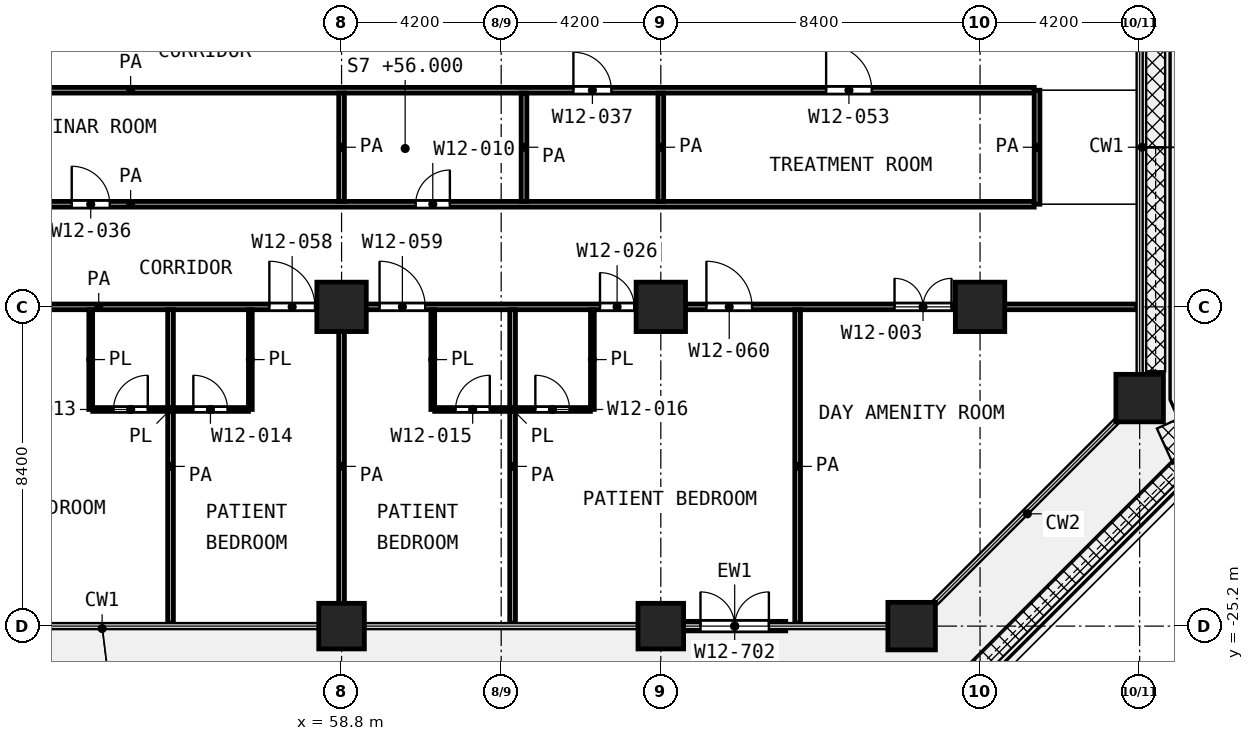
"""IFC4 building model, lengths in metres.
Left out: names, types, materials, properties, quantities, classifications, styles, units other than length and angle.
Written with IfcOpenShell. Run it as: python <this file> out.ifc"""

import sys

from ifc_helpers import new_model, si_unit, direction, frame, frame_2d, origin, origin_2d, place, context, subcontext, project, spatial, rectangle, extrude, element, fill, save


model = new_model("IFC4")
c1 = context("Model", 3, precision=1e-05, world=origin(), true_north=direction((0.0, 1.0)))
c2 = subcontext(c1, "Body", "Model", "MODEL_VIEW")
j1 = project(units=[si_unit("LENGTHUNIT", "METRE"), si_unit("PLANEANGLEUNIT", "RADIAN")], contexts=[c1])
p1 = place(None, origin())
s1 = spatial("IfcSite", under=j1, at=p1, CompositionType="ELEMENT")
p2 = place(p1, origin())
s2 = spatial("IfcBuilding", under=s1, at=p2, CompositionType="ELEMENT")
p3 = place(p2, frame((0.0, 0.0, 56.0)))
s3 = spatial("IfcBuildingStorey", under=s2, at=p3, CompositionType="ELEMENT", Elevation=56.0)
for number, where, z_axis, x_axis in (
    (1, (58.8, -16.8, 0.0), (0.0, 0.0, 1.0), (1.0, 0.0, 0.0)),
    (2, (67.2, -16.8, 0.0), (0.0, 0.0, 1.0), (1.0, 0.0, 0.0)),
    (3, (75.6, -16.8, 0.0), (0.0, 0.0, 1.0), (1.0, 0.0, 0.0)),
):
    element("IfcColumn", number, at=place(p3, frame(where, z_axis=z_axis, x_axis=x_axis)), inside=s3, PredefinedType="COLUMN", context=c2, shape_type="SweptSolid", body=[
        extrude(rectangle(XDim=1.3, YDim=1.3, at=origin_2d()), origin(), (0.0, 0.0, 1.0), 4.2),
    ])
p4 = place(p3, frame((79.8, -19.2, 0.0), z_axis=(0.0, 0.0, 1.0), x_axis=(1.0, 0.0, 0.0)))
e4 = element("IfcColumn", 4, at=p4, inside=s3, PredefinedType="COLUMN", context=c2, shape_type="SweptSolid", body=[
    extrude(rectangle(XDim=1.25, YDim=1.25, at=origin_2d()), origin(), (0.0, 0.0, 1.0), 4.2),
])
for number, where, z_axis, x_axis in (
    (5, (58.8, -25.2, 0.0), (0.0, 0.0, 1.0), (1.0, 0.0, 0.0)),
    (6, (67.2, -25.2, 0.0), (0.0, 0.0, 1.0), (1.0, 0.0, 0.0)),
):
    element("IfcColumn", number, at=place(p3, frame(where, z_axis=z_axis, x_axis=x_axis)), inside=s3, PredefinedType="COLUMN", context=c2, shape_type="SweptSolid", body=[
        extrude(rectangle(XDim=1.2, YDim=1.2, at=origin_2d()), origin(), (0.0, 0.0, 1.0), 4.2),
    ])
p5 = place(p3, frame((73.8, -25.2, 0.0), z_axis=(0.0, 0.0, 1.0), x_axis=(1.0, 0.0, 0.0)))
e7 = element("IfcColumn", 7, at=p5, inside=s3, PredefinedType="COLUMN", context=c2, shape_type="SweptSolid", body=[
    extrude(rectangle(XDim=1.25, YDim=1.25, at=origin_2d()), origin(), (0.0, 0.0, 1.0), 4.2),
])
p6 = place(p3, frame((67.8, -25.2, 0.0), z_axis=(0.0, 0.0, 1.0), x_axis=(1.0, 0.0, 0.0)))
e8 = element("IfcWall", 8, at=p6, inside=s3, PredefinedType="SOLIDWALL", context=c2, shape_type="SweptSolid", body=[
    extrude(rectangle(XDim=2.688, YDim=0.25, at=frame_2d((1.344, 0.0))), origin(), (0.0, 0.0, 1.0), 3.78),
])
p7 = place(p6, frame((0.444, 0.0, 0.0)))
e9 = element("IfcOpeningElement", 9, at=p7, cuts=e8, PredefinedType="OPENING", context=c2, shape_type="SweptSolid", body=[
    extrude(rectangle(XDim=1.8, YDim=2.1, at=frame_2d((0.9, 1.05))), frame((0.0, 0.135, 0.0), z_axis=(0.0, -1.0, 0.0), x_axis=(1.0, 0.0, 0.0)), (0.0, 0.0, 1.0), 0.27),
])
p8 = place(p3, frame((52.252, -19.5, 0.0), z_axis=(0.0, 0.0, 1.0), x_axis=(1.0, 0.0, 0.0)))
e10 = element("IfcWall", 10, at=p8, inside=s3, PredefinedType="PARTITIONING", context=c2, shape_type="SweptSolid", body=[
    extrude(rectangle(XDim=4.098, YDim=0.1, at=frame_2d((2.049, 0.0))), origin(), (0.0, 0.0, 1.0), 3.9),
])
p9 = place(p8, frame((0.549, 0.0, 0.0)))
e11 = element("IfcOpeningElement", 11, at=p9, cuts=e10, PredefinedType="OPENING", context=c2, shape_type="SweptSolid", body=[
    extrude(rectangle(XDim=0.9, YDim=2.1, at=frame_2d((0.45, 1.05))), frame((0.0, 0.06, 0.0), z_axis=(0.0, -1.0, 0.0), x_axis=(1.0, 0.0, 0.0)), (0.0, 0.0, 1.0), 0.12),
])
p10 = place(p8, frame((2.648, 0.0, 0.0)))
e12 = element("IfcOpeningElement", 12, at=p10, cuts=e10, PredefinedType="OPENING", context=c2, shape_type="SweptSolid", body=[
    extrude(rectangle(XDim=0.9, YDim=2.1, at=frame_2d((0.45, 1.05))), frame((0.0, 0.06, 0.0), z_axis=(0.0, -1.0, 0.0), x_axis=(1.0, 0.0, 0.0)), (0.0, 0.0, 1.0), 0.12),
])
p11 = place(p3, frame((61.25, -19.5, 0.0), z_axis=(0.0, 0.0, 1.0), x_axis=(1.0, 0.0, 0.0)))
e13 = element("IfcWall", 13, at=p11, inside=s3, PredefinedType="PARTITIONING", context=c2, shape_type="SweptSolid", body=[
    extrude(rectangle(XDim=4.098, YDim=0.1, at=frame_2d((2.049, 0.0))), origin(), (0.0, 0.0, 1.0), 3.9),
])
p12 = place(p11, frame((0.55, 0.0, 0.0)))
e14 = element("IfcOpeningElement", 14, at=p12, cuts=e13, PredefinedType="OPENING", context=c2, shape_type="SweptSolid", body=[
    extrude(rectangle(XDim=0.9, YDim=2.1, at=frame_2d((0.45, 1.05))), frame((0.0, 0.06, 0.0), z_axis=(0.0, -1.0, 0.0), x_axis=(1.0, 0.0, 0.0)), (0.0, 0.0, 1.0), 0.12),
])
p13 = place(p11, frame((2.649, 0.0, 0.0)))
e15 = element("IfcOpeningElement", 15, at=p13, cuts=e13, PredefinedType="OPENING", context=c2, shape_type="SweptSolid", body=[
    extrude(rectangle(XDim=0.9, YDim=2.1, at=frame_2d((0.45, 1.05))), frame((0.0, 0.06, 0.0), z_axis=(0.0, -1.0, 0.0), x_axis=(1.0, 0.0, 0.0)), (0.0, 0.0, 1.0), 0.12),
])
p14 = place(p3, frame((52.2, -19.499, 0.0), z_axis=(0.0, 0.0, 1.0), x_axis=(0.0, 1.0, 0.0)))
e16 = element("IfcWall", 16, at=p14, inside=s3, PredefinedType="PARTITIONING", context=c2, shape_type="SweptSolid", body=[
    extrude(rectangle(XDim=2.624, YDim=0.1, at=frame_2d((1.312, 0.0))), origin(), (0.0, 0.0, 1.0), 3.9),
])
for number, where, z_axis, x_axis in (
    (17, (56.4, -19.5, 0.0), (0.0, 0.0, 1.0), (0.0, 1.0, 0.0)),
    (18, (61.2, -19.5, 0.0), (0.0, 0.0, 1.0), (0.0, 1.0, 0.0)),
):
    element("IfcWall", number, at=place(p3, frame(where, z_axis=z_axis, x_axis=x_axis)), inside=s3, PredefinedType="PARTITIONING", context=c2, shape_type="SweptSolid", body=[
        extrude(rectangle(XDim=2.625, YDim=0.1, at=frame_2d((1.312, 0.0))), origin(), (0.0, 0.0, 1.0), 3.9),
    ])
p15 = place(p3, frame((65.4, -19.499, 0.0), z_axis=(0.0, 0.0, 1.0), x_axis=(0.0, 1.0, 0.0)))
e19 = element("IfcWall", 19, at=p15, inside=s3, PredefinedType="PARTITIONING", context=c2, shape_type="SweptSolid", body=[
    extrude(rectangle(XDim=2.624, YDim=0.1, at=frame_2d((1.312, 0.0))), origin(), (0.0, 0.0, 1.0), 3.9),
])
p16 = place(p3, frame((25.1, -16.8, 0.0), z_axis=(0.0, 0.0, 1.0), x_axis=(1.0, 0.0, 0.0)))
e20 = element("IfcWall", 20, at=p16, inside=s3, PredefinedType="PARTITIONING", context=c2, shape_type="SweptSolid", body=[
    extrude(rectangle(XDim=54.62, YDim=0.15, at=frame_2d((27.31, 0.0))), origin(), (0.0, 0.0, 1.0), 3.9),
])
p17 = place(p16, frame((1.45, 0.0, 0.0)))
e21 = element("IfcOpeningElement", 21, at=p17, cuts=e20, PredefinedType="OPENING", context=c2, shape_type="SweptSolid", body=[
    extrude(rectangle(XDim=1.5, YDim=2.1, at=frame_2d((0.75, 1.05))), frame((0.0, 0.085, 0.0), z_axis=(0.0, -1.0, 0.0), x_axis=(1.0, 0.0, 0.0)), (0.0, 0.0, 1.0), 0.17),
])
p18 = place(p16, frame((5.9, 0.0, 0.0)))
e22 = element("IfcOpeningElement", 22, at=p18, cuts=e20, PredefinedType="OPENING", context=c2, shape_type="SweptSolid", body=[
    extrude(rectangle(XDim=1.0, YDim=2.1, at=frame_2d((0.5, 1.05))), frame((0.0, 0.085, 0.0), z_axis=(0.0, -1.0, 0.0), x_axis=(1.0, 0.0, 0.0)), (0.0, 0.0, 1.0), 0.17),
])
p19 = place(p16, frame((10.0, 0.0, 0.0)))
e23 = element("IfcOpeningElement", 23, at=p19, cuts=e20, PredefinedType="OPENING", context=c2, shape_type="SweptSolid", body=[
    extrude(rectangle(XDim=1.2, YDim=2.1, at=frame_2d((0.6, 1.05))), frame((0.0, 0.085, 0.0), z_axis=(0.0, -1.0, 0.0), x_axis=(1.0, 0.0, 0.0)), (0.0, 0.0, 1.0), 0.17),
])
p20 = place(p16, frame((15.0, 0.0, 0.0)))
e24 = element("IfcOpeningElement", 24, at=p20, cuts=e20, PredefinedType="OPENING", context=c2, shape_type="SweptSolid", body=[
    extrude(rectangle(XDim=1.2, YDim=2.1, at=frame_2d((0.6, 1.05))), frame((0.0, 0.085, 0.0), z_axis=(0.0, -1.0, 0.0), x_axis=(1.0, 0.0, 0.0)), (0.0, 0.0, 1.0), 0.17),
])
p21 = place(p16, frame((18.1, 0.0, 0.0)))
e25 = element("IfcOpeningElement", 25, at=p21, cuts=e20, PredefinedType="OPENING", context=c2, shape_type="SweptSolid", body=[
    extrude(rectangle(XDim=1.2, YDim=2.1, at=frame_2d((0.6, 1.05))), frame((0.0, 0.085, 0.0), z_axis=(0.0, -1.0, 0.0), x_axis=(1.0, 0.0, 0.0)), (0.0, 0.0, 1.0), 0.17),
])
p22 = place(p16, frame((23.4, 0.0, 0.0)))
e26 = element("IfcOpeningElement", 26, at=p22, cuts=e20, PredefinedType="OPENING", context=c2, shape_type="SweptSolid", body=[
    extrude(rectangle(XDim=1.2, YDim=2.1, at=frame_2d((0.6, 1.05))), frame((0.0, 0.085, 0.0), z_axis=(0.0, -1.0, 0.0), x_axis=(1.0, 0.0, 0.0)), (0.0, 0.0, 1.0), 0.17),
])
p23 = place(p16, frame((21.95, 0.0, 0.0)))
e27 = element("IfcOpeningElement", 27, at=p23, cuts=e20, PredefinedType="OPENING", context=c2, shape_type="SweptSolid", body=[
    extrude(rectangle(XDim=1.1, YDim=2.1, at=frame_2d((0.55, 1.05))), frame((0.0, 0.085, 0.0), z_axis=(0.0, -1.0, 0.0), x_axis=(1.0, 0.0, 0.0)), (0.0, 0.0, 1.0), 0.17),
])
p24 = place(p16, frame((31.8, 0.0, 0.0)))
e28 = element("IfcOpeningElement", 28, at=p24, cuts=e20, PredefinedType="OPENING", context=c2, shape_type="SweptSolid", body=[
    extrude(rectangle(XDim=1.2, YDim=2.1, at=frame_2d((0.6, 1.05))), frame((0.0, 0.085, 0.0), z_axis=(0.0, -1.0, 0.0), x_axis=(1.0, 0.0, 0.0)), (0.0, 0.0, 1.0), 0.17),
])
p25 = place(p16, frame((34.7, 0.0, 0.0)))
e29 = element("IfcOpeningElement", 29, at=p25, cuts=e20, PredefinedType="OPENING", context=c2, shape_type="SweptSolid", body=[
    extrude(rectangle(XDim=1.2, YDim=2.1, at=frame_2d((0.6, 1.05))), frame((0.0, 0.085, 0.0), z_axis=(0.0, -1.0, 0.0), x_axis=(1.0, 0.0, 0.0)), (0.0, 0.0, 1.0), 0.17),
])
p26 = place(p16, frame((43.3, 0.0, 0.0)))
e30 = element("IfcOpeningElement", 30, at=p26, cuts=e20, PredefinedType="OPENING", context=c2, shape_type="SweptSolid", body=[
    extrude(rectangle(XDim=1.2, YDim=2.1, at=frame_2d((0.6, 1.05))), frame((0.0, 0.085, 0.0), z_axis=(0.0, -1.0, 0.0), x_axis=(1.0, 0.0, 0.0)), (0.0, 0.0, 1.0), 0.17),
])
p27 = place(p16, frame((40.5, 0.0, 0.0)))
e31 = element("IfcOpeningElement", 31, at=p27, cuts=e20, PredefinedType="OPENING", context=c2, shape_type="SweptSolid", body=[
    extrude(rectangle(XDim=0.9, YDim=2.1, at=frame_2d((0.45, 1.05))), frame((0.0, 0.085, 0.0), z_axis=(0.0, -1.0, 0.0), x_axis=(1.0, 0.0, 0.0)), (0.0, 0.0, 1.0), 0.17),
])
p28 = place(p16, frame((48.25, 0.0, 0.0)))
e32 = element("IfcOpeningElement", 32, at=p28, cuts=e20, PredefinedType="OPENING", context=c2, shape_type="SweptSolid", body=[
    extrude(rectangle(XDim=1.5, YDim=2.1, at=frame_2d((0.75, 1.05))), frame((0.0, 0.085, 0.0), z_axis=(0.0, -1.0, 0.0), x_axis=(1.0, 0.0, 0.0)), (0.0, 0.0, 1.0), 0.17),
])
p29 = place(p3, frame((29.475, -14.1, 0.0), z_axis=(0.0, 0.0, 1.0), x_axis=(1.0, 0.0, 0.0)))
e33 = element("IfcWall", 33, at=p29, inside=s3, PredefinedType="PARTITIONING", context=c2, shape_type="SweptSolid", body=[
    extrude(rectangle(XDim=47.55, YDim=0.15, at=frame_2d((23.775, 0.0))), origin(), (0.0, 0.0, 1.0), 3.9),
])
p30 = place(p29, frame((7.525, 0.0, 0.0)))
e34 = element("IfcOpeningElement", 34, at=p30, cuts=e33, PredefinedType="OPENING", context=c2, shape_type="SweptSolid", body=[
    extrude(rectangle(XDim=1.0, YDim=2.1, at=frame_2d((0.5, 1.05))), frame((0.0, 0.085, 0.0), z_axis=(0.0, -1.0, 0.0), x_axis=(1.0, 0.0, 0.0)), (0.0, 0.0, 1.0), 0.17),
])
p31 = place(p29, frame((22.225, 0.0, 0.0)))
e35 = element("IfcOpeningElement", 35, at=p31, cuts=e33, PredefinedType="OPENING", context=c2, shape_type="SweptSolid", body=[
    extrude(rectangle(XDim=1.0, YDim=2.1, at=frame_2d((0.5, 1.05))), frame((0.0, 0.085, 0.0), z_axis=(0.0, -1.0, 0.0), x_axis=(1.0, 0.0, 0.0)), (0.0, 0.0, 1.0), 0.17),
])
p32 = place(p29, frame((31.275, 0.0, 0.0)))
e36 = element("IfcOpeningElement", 36, at=p32, cuts=e33, PredefinedType="OPENING", context=c2, shape_type="SweptSolid", body=[
    extrude(rectangle(XDim=0.9, YDim=2.1, at=frame_2d((0.45, 1.05))), frame((0.0, 0.085, 0.0), z_axis=(0.0, -1.0, 0.0), x_axis=(1.0, 0.0, 0.0)), (0.0, 0.0, 1.0), 0.17),
])
p33 = place(p3, frame((29.475, -11.1, 0.0), z_axis=(0.0, 0.0, 1.0), x_axis=(1.0, 0.0, 0.0)))
e37 = element("IfcWall", 37, at=p33, inside=s3, PredefinedType="PARTITIONING", context=c2, shape_type="SweptSolid", body=[
    extrude(rectangle(XDim=47.55, YDim=0.15, at=frame_2d((23.775, 0.0))), origin(), (0.0, 0.0, 1.0), 3.9),
])
p34 = place(p33, frame((35.425, 0.0, 0.0)))
e38 = element("IfcOpeningElement", 38, at=p34, cuts=e37, PredefinedType="OPENING", context=c2, shape_type="SweptSolid", body=[
    extrude(rectangle(XDim=1.0, YDim=2.1, at=frame_2d((0.5, 1.05))), frame((0.0, 0.085, 0.0), z_axis=(0.0, -1.0, 0.0), x_axis=(1.0, 0.0, 0.0)), (0.0, 0.0, 1.0), 0.17),
])
p35 = place(p33, frame((42.075, 0.0, 0.0)))
e39 = element("IfcOpeningElement", 39, at=p35, cuts=e37, PredefinedType="OPENING", context=c2, shape_type="SweptSolid", body=[
    extrude(rectangle(XDim=1.2, YDim=2.1, at=frame_2d((0.6, 1.05))), frame((0.0, 0.085, 0.0), z_axis=(0.0, -1.0, 0.0), x_axis=(1.0, 0.0, 0.0)), (0.0, 0.0, 1.0), 0.17),
])
for number, where, z_axis, x_axis in (
    (40, (54.3, -25.12, 0.0), (0.0, 0.0, 1.0), (0.0, 1.0, 0.0)),
    (41, (58.8, -25.12, 0.0), (0.0, 0.0, 1.0), (0.0, 1.0, 0.0)),
):
    element("IfcWall", number, at=place(p3, frame(where, z_axis=z_axis, x_axis=x_axis)), inside=s3, PredefinedType="PARTITIONING", context=c2, shape_type="SweptSolid", body=[
        extrude(rectangle(XDim=8.245, YDim=0.15, at=frame_2d((4.123, 0.0))), origin(), (0.0, 0.0, 1.0), 3.9),
    ])
p36 = place(p3, frame((58.8, -14.025, 0.0), z_axis=(0.0, 0.0, 1.0), x_axis=(0.0, 1.0, 0.0)))
e42 = element("IfcWall", 42, at=p36, inside=s3, PredefinedType="PARTITIONING", context=c2, shape_type="SweptSolid", body=[
    extrude(rectangle(XDim=2.85, YDim=0.15, at=frame_2d((1.425, 0.0))), origin(), (0.0, 0.0, 1.0), 3.9),
])
p37 = place(p3, frame((63.3, -25.12, 0.0), z_axis=(0.0, 0.0, 1.0), x_axis=(0.0, 1.0, 0.0)))
e43 = element("IfcWall", 43, at=p37, inside=s3, PredefinedType="PARTITIONING", context=c2, shape_type="SweptSolid", body=[
    extrude(rectangle(XDim=8.245, YDim=0.15, at=frame_2d((4.123, 0.0))), origin(), (0.0, 0.0, 1.0), 3.9),
])
for number, where, z_axis, x_axis in (
    (44, (63.6, -14.025, 0.0), (0.0, 0.0, 1.0), (0.0, 1.0, 0.0)),
    (45, (67.2, -14.025, 0.0), (0.0, 0.0, 1.0), (0.0, 1.0, 0.0)),
):
    element("IfcWall", number, at=place(p3, frame(where, z_axis=z_axis, x_axis=x_axis)), inside=s3, PredefinedType="PARTITIONING", context=c2, shape_type="SweptSolid", body=[
        extrude(rectangle(XDim=2.85, YDim=0.15, at=frame_2d((1.425, 0.0))), origin(), (0.0, 0.0, 1.0), 3.9),
    ])
p38 = place(p3, frame((70.8, -25.12, 0.0), z_axis=(0.0, 0.0, 1.0), x_axis=(0.0, 1.0, 0.0)))
e46 = element("IfcWall", 46, at=p38, inside=s3, PredefinedType="PARTITIONING", context=c2, shape_type="SweptSolid", body=[
    extrude(rectangle(XDim=8.245, YDim=0.15, at=frame_2d((4.123, 0.0))), origin(), (0.0, 0.0, 1.0), 3.9),
])
p39 = place(p3, frame((77.1, -14.1, 0.0), z_axis=(0.0, 0.0, 1.0), x_axis=(0.0, 1.0, 0.0)))
e47 = element("IfcWall", 47, at=p39, inside=s3, PredefinedType="PARTITIONING", context=c2, shape_type="SweptSolid", body=[
    extrude(rectangle(XDim=3.0, YDim=0.15, at=frame_2d((1.5, 0.0))), origin(), (0.0, 0.0, 1.0), 3.9),
])
p40 = place(p7, origin())
e48 = element("IfcDoor", 48, at=p40, inside=s3, OperationType="DOUBLE_DOOR_SINGLE_SWING", PredefinedType="DOOR", context=c2, shape_type="SweptSolid", body=[
    extrude(rectangle(XDim=1.8, YDim=2.1, at=frame_2d((0.9, 1.05))), frame((0.0, 0.025, 0.0), z_axis=(0.0, -1.0, 0.0), x_axis=(1.0, 0.0, 0.0)), (0.0, 0.0, 1.0), 0.05),
])
fill(e9, e48)
p41 = place(p31, origin())
e49 = element("IfcDoor", 49, at=p41, inside=s3, OperationType="SINGLE_SWING_LEFT", PredefinedType="DOOR", context=c2, shape_type="SweptSolid", body=[
    extrude(rectangle(XDim=1.0, YDim=2.1, at=frame_2d((0.5, 1.05))), frame((0.0, 0.025, 0.0), z_axis=(0.0, -1.0, 0.0), x_axis=(1.0, 0.0, 0.0)), (0.0, 0.0, 1.0), 0.05),
])
fill(e35, e49)
p42 = place(p32, origin())
e50 = element("IfcDoor", 50, at=p42, inside=s3, OperationType="SINGLE_SWING_RIGHT", PredefinedType="DOOR", context=c2, shape_type="SweptSolid", body=[
    extrude(rectangle(XDim=0.9, YDim=2.1, at=frame_2d((0.45, 1.05))), frame((0.0, 0.025, 0.0), z_axis=(0.0, -1.0, 0.0), x_axis=(1.0, 0.0, 0.0)), (0.0, 0.0, 1.0), 0.05),
])
fill(e36, e50)
p43 = place(p34, origin())
e51 = element("IfcDoor", 51, at=p43, inside=s3, OperationType="SINGLE_SWING_LEFT", PredefinedType="DOOR", context=c2, shape_type="SweptSolid", body=[
    extrude(rectangle(XDim=1.0, YDim=2.1, at=frame_2d((0.5, 1.05))), frame((0.0, 0.025, 0.0), z_axis=(0.0, -1.0, 0.0), x_axis=(1.0, 0.0, 0.0)), (0.0, 0.0, 1.0), 0.05),
])
fill(e38, e51)
p44 = place(p35, origin())
e52 = element("IfcDoor", 52, at=p44, inside=s3, OperationType="SINGLE_SWING_LEFT", PredefinedType="DOOR", context=c2, shape_type="SweptSolid", body=[
    extrude(rectangle(XDim=1.2, YDim=2.1, at=frame_2d((0.6, 1.05))), frame((0.0, 0.025, 0.0), z_axis=(0.0, -1.0, 0.0), x_axis=(1.0, 0.0, 0.0)), (0.0, 0.0, 1.0), 0.05),
])
fill(e39, e52)
p45 = place(p9, origin())
e53 = element("IfcDoor", 53, at=p45, inside=s3, OperationType="SINGLE_SWING_RIGHT", PredefinedType="DOOR", context=c2, shape_type="SweptSolid", body=[
    extrude(rectangle(XDim=0.9, YDim=2.1, at=frame_2d((0.45, 1.05))), frame((0.0, 0.025, 0.0), z_axis=(0.0, -1.0, 0.0), x_axis=(1.0, 0.0, 0.0)), (0.0, 0.0, 1.0), 0.05),
])
fill(e11, e53)
p46 = place(p24, origin())
e54 = element("IfcDoor", 54, at=p46, inside=s3, OperationType="SINGLE_SWING_LEFT", PredefinedType="DOOR", context=c2, shape_type="SweptSolid", body=[
    extrude(rectangle(XDim=1.2, YDim=2.1, at=frame_2d((0.6, 1.05))), frame((0.0, 0.025, 0.0), z_axis=(0.0, -1.0, 0.0), x_axis=(1.0, 0.0, 0.0)), (0.0, 0.0, 1.0), 0.05),
])
fill(e28, e54)
p47 = place(p10, origin())
e55 = element("IfcDoor", 55, at=p47, inside=s3, OperationType="SINGLE_SWING_LEFT", PredefinedType="DOOR", context=c2, shape_type="SweptSolid", body=[
    extrude(rectangle(XDim=0.9, YDim=2.1, at=frame_2d((0.45, 1.05))), frame((0.0, 0.025, 0.0), z_axis=(0.0, -1.0, 0.0), x_axis=(1.0, 0.0, 0.0)), (0.0, 0.0, 1.0), 0.05),
])
fill(e12, e55)
p48 = place(p25, origin())
e56 = element("IfcDoor", 56, at=p48, inside=s3, OperationType="SINGLE_SWING_LEFT", PredefinedType="DOOR", context=c2, shape_type="SweptSolid", body=[
    extrude(rectangle(XDim=1.2, YDim=2.1, at=frame_2d((0.6, 1.05))), frame((0.0, 0.025, 0.0), z_axis=(0.0, -1.0, 0.0), x_axis=(1.0, 0.0, 0.0)), (0.0, 0.0, 1.0), 0.05),
])
fill(e29, e56)
p49 = place(p12, origin())
e57 = element("IfcDoor", 57, at=p49, inside=s3, OperationType="SINGLE_SWING_RIGHT", PredefinedType="DOOR", context=c2, shape_type="SweptSolid", body=[
    extrude(rectangle(XDim=0.9, YDim=2.1, at=frame_2d((0.45, 1.05))), frame((0.0, 0.025, 0.0), z_axis=(0.0, -1.0, 0.0), x_axis=(1.0, 0.0, 0.0)), (0.0, 0.0, 1.0), 0.05),
])
fill(e14, e57)
p50 = place(p26, origin())
e58 = element("IfcDoor", 58, at=p50, inside=s3, OperationType="SINGLE_SWING_LEFT", PredefinedType="DOOR", context=c2, shape_type="SweptSolid", body=[
    extrude(rectangle(XDim=1.2, YDim=2.1, at=frame_2d((0.6, 1.05))), frame((0.0, 0.025, 0.0), z_axis=(0.0, -1.0, 0.0), x_axis=(1.0, 0.0, 0.0)), (0.0, 0.0, 1.0), 0.05),
])
fill(e30, e58)
p51 = place(p27, origin())
e59 = element("IfcDoor", 59, at=p51, inside=s3, OperationType="SINGLE_SWING_LEFT", PredefinedType="DOOR", context=c2, shape_type="SweptSolid", body=[
    extrude(rectangle(XDim=0.9, YDim=2.1, at=frame_2d((0.45, 1.05))), frame((0.0, 0.025, 0.0), z_axis=(0.0, -1.0, 0.0), x_axis=(1.0, 0.0, 0.0)), (0.0, 0.0, 1.0), 0.05),
])
fill(e31, e59)
p52 = place(p13, origin())
e60 = element("IfcDoor", 60, at=p52, inside=s3, OperationType="SINGLE_SWING_LEFT", PredefinedType="DOOR", context=c2, shape_type="SweptSolid", body=[
    extrude(rectangle(XDim=0.9, YDim=2.1, at=frame_2d((0.45, 1.05))), frame((0.0, 0.025, 0.0), z_axis=(0.0, -1.0, 0.0), x_axis=(1.0, 0.0, 0.0)), (0.0, 0.0, 1.0), 0.05),
])
fill(e15, e60)
p53 = place(p28, origin())
e61 = element("IfcDoor", 61, at=p53, inside=s3, OperationType="DOUBLE_DOOR_SINGLE_SWING", PredefinedType="DOOR", context=c2, shape_type="SweptSolid", body=[
    extrude(rectangle(XDim=1.5, YDim=2.1, at=frame_2d((0.75, 1.05))), frame((0.0, 0.025, 0.0), z_axis=(0.0, -1.0, 0.0), x_axis=(1.0, 0.0, 0.0)), (0.0, 0.0, 1.0), 0.05),
])
fill(e32, e61)
save(model, sys.argv[1])
